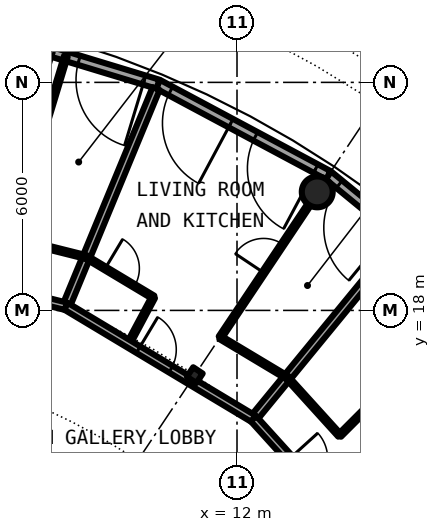
"""IFC4 building model, lengths in metres.
Left out: names, types, materials, properties, quantities, classifications, styles, units other than length and angle.
Written with IfcOpenShell. Run it as: python <this file> out.ifc"""

import sys

from ifc_helpers import new_model, si_unit, direction, frame, frame_2d, origin, origin_2d, place, context, subcontext, project, spatial, rectangle, hollow_circle, i_section, extrude, element, fill, save


model = new_model("IFC4")
c1 = context("Model", 3, precision=1e-05, world=origin(), true_north=direction((0.0, 1.0)))
c2 = subcontext(c1, "Body", "Model", "MODEL_VIEW")
j1 = project(units=[si_unit("LENGTHUNIT", "METRE"), si_unit("PLANEANGLEUNIT", "RADIAN")], contexts=[c1])
p1 = place(None, origin())
s1 = spatial("IfcSite", under=j1, at=p1, CompositionType="ELEMENT")
p2 = place(p1, origin())
s2 = spatial("IfcBuilding", under=s1, at=p2, CompositionType="ELEMENT")
p3 = place(p2, frame((0.0, 0.0, 237.1)))
s3 = spatial("IfcBuildingStorey", under=s2, at=p3, CompositionType="ELEMENT", Elevation=237.1)
p4 = place(p3, frame((14.112, 21.119, 0.0), z_axis=(0.0, 0.0, 1.0), x_axis=(1.0, 0.0, 0.0)))
e1 = element("IfcColumn", 1, at=p4, inside=s3, PredefinedType="COLUMN", context=c2, shape_type="SweptSolid", body=[
    extrude(hollow_circle(Radius=0.406, WallThickness=0.03, at=origin_2d()), origin(), (0.0, 0.0, 1.0), 3.05),
])
p5 = place(p3, frame((10.889, 16.297, 0.0), z_axis=(0.0, 0.0, 1.0), x_axis=(0.55557023302, 0.831469612303, 0.0)))
e2 = element("IfcColumn", 2, at=p5, inside=s3, PredefinedType="COLUMN", context=c2, shape_type="SweptSolid", body=[
    extrude(i_section(OverallWidth=0.3, OverallDepth=0.3, WebThickness=0.011, FlangeThickness=0.019, FilletRadius=0.027, at=origin_2d()), origin(), (0.0, 0.0, 1.0), 3.05),
])
p6 = place(p3, frame((18.332, 18.332, 0.0), z_axis=(0.0, 0.0, 1.0), x_axis=(-0.77306189429, 0.63433059803, 0.0)))
e3 = element("IfcWall", 3, at=p6, inside=s3, PredefinedType="SOLIDWALL", context=c2, shape_type="SweptSolid", body=[
    extrude(rectangle(XDim=5.082, YDim=0.25, at=frame_2d((2.541, 0.0))), origin(), (0.0, 0.0, 1.0), 2.7),
])
p7 = place(p6, frame((0.374, 0.0, 0.0)))
e4 = element("IfcOpeningElement", 4, at=p7, cuts=e3, PredefinedType="OPENING", context=c2, shape_type="SweptSolid", body=[
    extrude(rectangle(XDim=1.8, YDim=2.2, at=frame_2d((0.9, 1.1))), frame((0.0, 0.135, 0.0), z_axis=(0.0, -1.0, 0.0), x_axis=(1.0, 0.0, 0.0)), (0.0, 0.0, 1.0), 0.27),
])
p8 = place(p6, frame((2.909, 0.0, 0.0)))
e5 = element("IfcOpeningElement", 5, at=p8, cuts=e3, PredefinedType="OPENING", context=c2, shape_type="SweptSolid", body=[
    extrude(rectangle(XDim=1.8, YDim=2.2, at=frame_2d((0.9, 1.1))), frame((0.0, 0.135, 0.0), z_axis=(0.0, -1.0, 0.0), x_axis=(1.0, 0.0, 0.0)), (0.0, 0.0, 1.0), 0.27),
])
p9 = place(p3, frame((14.403, 21.556, 0.0), z_axis=(0.0, 0.0, 1.0), x_axis=(-0.881903089468, 0.47143073806, 0.0)))
e6 = element("IfcWall", 6, at=p9, inside=s3, PredefinedType="SOLIDWALL", context=c2, shape_type="SweptSolid", body=[
    extrude(rectangle(XDim=5.082, YDim=0.25, at=frame_2d((2.541, 0.0))), origin(), (0.0, 0.0, 1.0), 2.7),
])
p10 = place(p9, frame((0.374, 0.0, 0.0)))
e7 = element("IfcOpeningElement", 7, at=p10, cuts=e6, PredefinedType="OPENING", context=c2, shape_type="SweptSolid", body=[
    extrude(rectangle(XDim=1.8, YDim=2.2, at=frame_2d((0.9, 1.1))), frame((0.0, 0.135, 0.0), z_axis=(0.0, -1.0, 0.0), x_axis=(1.0, 0.0, 0.0)), (0.0, 0.0, 1.0), 0.27),
])
p11 = place(p9, frame((2.909, 0.0, 0.0)))
e8 = element("IfcOpeningElement", 8, at=p11, cuts=e6, PredefinedType="OPENING", context=c2, shape_type="SweptSolid", body=[
    extrude(rectangle(XDim=1.8, YDim=2.2, at=frame_2d((0.9, 1.1))), frame((0.0, 0.135, 0.0), z_axis=(0.0, -1.0, 0.0), x_axis=(1.0, 0.0, 0.0)), (0.0, 0.0, 1.0), 0.27),
])
p12 = place(p3, frame((9.921, 23.952, 0.0), z_axis=(0.0, 0.0, 1.0), x_axis=(-0.956941126395, 0.290282070774, 0.0)))
e9 = element("IfcWall", 9, at=p12, inside=s3, PredefinedType="SOLIDWALL", context=c2, shape_type="SweptSolid", body=[
    extrude(rectangle(XDim=5.082, YDim=0.25, at=frame_2d((2.541, 0.0))), origin(), (0.0, 0.0, 1.0), 2.7),
])
p13 = place(p12, frame((0.374, 0.0, 0.0)))
e10 = element("IfcOpeningElement", 10, at=p13, cuts=e9, PredefinedType="OPENING", context=c2, shape_type="SweptSolid", body=[
    extrude(rectangle(XDim=1.8, YDim=2.2, at=frame_2d((0.9, 1.1))), frame((0.0, 0.135, 0.0), z_axis=(0.0, -1.0, 0.0), x_axis=(1.0, 0.0, 0.0)), (0.0, 0.0, 1.0), 0.27),
])
p14 = place(p12, frame((2.861, 0.0, 0.0)))
e11 = element("IfcOpeningElement", 11, at=p14, cuts=e9, PredefinedType="OPENING", context=c2, shape_type="SweptSolid", body=[
    extrude(rectangle(XDim=1.8, YDim=2.2, at=frame_2d((0.9, 1.1))), frame((0.0, 0.135, 0.0), z_axis=(0.0, -1.0, 0.0), x_axis=(1.0, 0.0, 0.0)), (0.0, 0.0, 1.0), 0.27),
])
p15 = place(p3, frame((7.501, 18.108, 0.0), z_axis=(0.0, 0.0, 1.0), x_axis=(0.382282230395, 0.924045613768, 0.0)))
e12 = element("IfcWall", 12, at=p15, inside=s3, PredefinedType="PARTITIONING", context=c2, shape_type="SweptSolid", body=[
    extrude(rectangle(XDim=6.2, YDim=0.2, at=frame_2d((3.1, 0.0))), origin(), (0.0, 0.0, 1.0), 2.7),
])
p16 = place(p3, frame((6.044, 19.901, 0.0), z_axis=(0.0, 0.0, 1.0), x_axis=(0.290516718077, 0.956869916194, 0.0)))
e13 = element("IfcWall", 13, at=p16, inside=s3, PredefinedType="PARTITIONING", context=c2, shape_type="SweptSolid", body=[
    extrude(rectangle(XDim=5.002, YDim=0.1, at=frame_2d((2.501, 0.0))), origin(), (0.0, 0.0, 1.0), 2.7),
])
p17 = place(p16, frame((2.051, 0.0, 0.0)))
e14 = element("IfcOpeningElement", 14, at=p17, cuts=e13, PredefinedType="OPENING", context=c2, shape_type="SweptSolid", body=[
    extrude(rectangle(XDim=0.9, YDim=2.3, at=frame_2d((0.45, 1.15))), frame((0.0, 0.06, 0.0), z_axis=(0.0, -1.0, 0.0), x_axis=(1.0, 0.0, 0.0)), (0.0, 0.0, 1.0), 0.12),
])
p18 = place(p3, frame((9.145, 17.122, 0.0), z_axis=(0.0, 0.0, 1.0), x_axis=(0.471072596947, 0.882094444153, 0.0)))
e15 = element("IfcWall", 15, at=p18, inside=s3, PredefinedType="PARTITIONING", context=c2, shape_type="SweptSolid", body=[
    extrude(rectangle(XDim=1.386, YDim=0.1, at=frame_2d((0.693, 0.0))), origin(), (0.0, 0.0, 1.0), 2.7),
])
p19 = place(p3, frame((11.56, 17.289, 0.0), z_axis=(0.0, 0.0, 1.0), x_axis=(0.555959489687, 0.831209387475, 0.0)))
e16 = element("IfcWall", 16, at=p19, inside=s3, PredefinedType="PARTITIONING", context=c2, shape_type="SweptSolid", body=[
    extrude(rectangle(XDim=4.203, YDim=0.1, at=frame_2d((2.102, 0.0))), origin(), (0.0, 0.0, 1.0), 2.7),
])
p20 = place(p19, frame((2.051, 0.0, 0.0)))
e17 = element("IfcOpeningElement", 17, at=p20, cuts=e16, PredefinedType="OPENING", context=c2, shape_type="SweptSolid", body=[
    extrude(rectangle(XDim=0.9, YDim=2.3, at=frame_2d((0.45, 1.15))), frame((0.0, 0.06, 0.0), z_axis=(0.0, -1.0, 0.0), x_axis=(1.0, 0.0, 0.0)), (0.0, 0.0, 1.0), 0.12),
])
p21 = place(p3, frame((12.432, 15.153, 0.0), z_axis=(0.0, 0.0, 1.0), x_axis=(0.634356436091, 0.773040692324, 0.0)))
e18 = element("IfcWall", 18, at=p21, inside=s3, PredefinedType="PARTITIONING", context=c2, shape_type="SweptSolid", body=[
    extrude(rectangle(XDim=6.2, YDim=0.2, at=frame_2d((3.1, 0.0))), origin(), (0.0, 0.0, 1.0), 2.7),
])
p22 = place(p3, frame((14.702, 14.711, 0.0), z_axis=(0.0, 0.0, 1.0), x_axis=(0.706911528738, 0.707301979735, 0.0)))
e19 = element("IfcWall", 19, at=p22, inside=s3, PredefinedType="PARTITIONING", context=c2, shape_type="SweptSolid", body=[
    extrude(rectangle(XDim=5.002, YDim=0.1, at=frame_2d((2.501, 0.0))), origin(), (0.0, 0.0, 1.0), 2.7),
])
p23 = place(p22, frame((2.051, 0.0, 0.0)))
e20 = element("IfcOpeningElement", 20, at=p23, cuts=e19, PredefinedType="OPENING", context=c2, shape_type="SweptSolid", body=[
    extrude(rectangle(XDim=0.9, YDim=2.3, at=frame_2d((0.45, 1.15))), frame((0.0, 0.06, 0.0), z_axis=(0.0, -1.0, 0.0), x_axis=(1.0, 0.0, 0.0)), (0.0, 0.0, 1.0), 0.12),
])
p24 = place(p3, frame((4.357, 14.353, 0.0), z_axis=(0.0, 0.0, 1.0), x_axis=(0.803168959756, -0.595751308923, 0.0)))
e21 = element("IfcWall", 21, at=p24, inside=s3, PredefinedType="PARTITIONING", context=c2, shape_type="SweptSolid", body=[
    extrude(rectangle(XDim=8.659, YDim=0.2, at=frame_2d((4.33, 0.0))), origin(), (0.0, 0.0, 1.0), 2.7),
])
p25 = place(p24, frame((3.829, 0.0, 0.0)))
e22 = element("IfcOpeningElement", 22, at=p25, cuts=e21, PredefinedType="OPENING", context=c2, shape_type="SweptSolid", body=[
    extrude(rectangle(XDim=1.0, YDim=2.3, at=frame_2d((0.5, 1.15))), frame((0.0, 0.11, 0.0), z_axis=(0.0, -1.0, 0.0), x_axis=(1.0, 0.0, 0.0)), (0.0, 0.0, 1.0), 0.22),
])
p26 = place(p3, frame((1.921, 19.506, 0.0), z_axis=(0.0, 0.0, 1.0), x_axis=(0.970012544183, -0.243054858266, 0.0)))
e23 = element("IfcWall", 23, at=p26, inside=s3, PredefinedType="PARTITIONING", context=c2, shape_type="SweptSolid", body=[
    extrude(rectangle(XDim=5.753, YDim=0.2, at=frame_2d((2.876, 0.0))), origin(), (0.0, 0.0, 1.0), 2.45),
])
p27 = place(p26, frame((3.335, 0.0, 0.0)))
e24 = element("IfcOpeningElement", 24, at=p27, cuts=e23, PredefinedType="OPENING", context=c2, shape_type="SweptSolid", body=[
    extrude(rectangle(XDim=1.0, YDim=2.3, at=frame_2d((0.5, 1.15))), frame((0.0, 0.11, 0.0), z_axis=(0.0, -1.0, 0.0), x_axis=(1.0, 0.0, 0.0)), (0.0, 0.0, 1.0), 0.22),
])
p28 = place(p3, frame((7.501, 18.108, 0.0), z_axis=(0.0, 0.0, 1.0), x_axis=(0.857560257806, -0.514383518624, 0.0)))
e25 = element("IfcWall", 25, at=p28, inside=s3, PredefinedType="PARTITIONING", context=c2, shape_type="SweptSolid", body=[
    extrude(rectangle(XDim=5.758, YDim=0.2, at=frame_2d((2.879, 0.0))), origin(), (0.0, 0.0, 1.0), 2.45),
])
p29 = place(p28, frame((2.217, 0.0, 0.0)))
e26 = element("IfcOpeningElement", 26, at=p29, cuts=e25, PredefinedType="OPENING", context=c2, shape_type="SweptSolid", body=[
    extrude(rectangle(XDim=1.0, YDim=2.3, at=frame_2d((0.5, 1.15))), frame((0.0, 0.11, 0.0), z_axis=(0.0, -1.0, 0.0), x_axis=(1.0, 0.0, 0.0)), (0.0, 0.0, 1.0), 0.22),
])
p30 = place(p3, frame((12.434, 15.151, 0.0), z_axis=(0.0, 0.0, 1.0), x_axis=(0.671619657805, -0.740896102871, 0.0)))
e27 = element("IfcWall", 27, at=p30, inside=s3, PredefinedType="PARTITIONING", context=c2, shape_type="SweptSolid", body=[
    extrude(rectangle(XDim=5.6, YDim=0.2, at=frame_2d((2.8, 0.0))), origin(), (0.0, 0.0, 1.0), 2.45),
])
p31 = place(p30, frame((1.417, 0.0, 0.0)))
e28 = element("IfcOpeningElement", 28, at=p31, cuts=e27, PredefinedType="OPENING", context=c2, shape_type="SweptSolid", body=[
    extrude(rectangle(XDim=1.0, YDim=2.3, at=frame_2d((0.5, 1.15))), frame((0.0, 0.11, 0.0), z_axis=(0.0, -1.0, 0.0), x_axis=(1.0, 0.0, 0.0)), (0.0, 0.0, 1.0), 0.22),
])
p32 = place(p3, frame((6.032, 19.904, 0.0), z_axis=(0.0, 0.0, 1.0), x_axis=(0.970023493589, -0.243011155889, 0.0)))
e29 = element("IfcWall", 29, at=p32, inside=s3, PredefinedType="PARTITIONING", context=c2, shape_type="SweptSolid", body=[
    extrude(rectangle(XDim=2.053, YDim=0.1, at=frame_2d((1.027, 0.0))), origin(), (0.0, 0.0, 1.0), 2.7),
])
p33 = place(p3, frame((8.036, 19.401, 0.0), z_axis=(0.0, 0.0, 1.0), x_axis=(0.857838403859, -0.513919519832, 0.0)))
e30 = element("IfcWall", 30, at=p33, inside=s3, PredefinedType="PARTITIONING", context=c2, shape_type="SweptSolid", body=[
    extrude(rectangle(XDim=2.056, YDim=0.1, at=frame_2d((1.028, 0.0))), origin(), (0.0, 0.0, 1.0), 2.7),
])
p34 = place(p33, frame((0.577, 0.0, 0.0)))
e31 = element("IfcOpeningElement", 31, at=p34, cuts=e30, PredefinedType="OPENING", context=c2, shape_type="SweptSolid", body=[
    extrude(rectangle(XDim=0.9, YDim=2.3, at=frame_2d((0.45, 1.15))), frame((0.0, 0.06, 0.0), z_axis=(0.0, -1.0, 0.0), x_axis=(1.0, 0.0, 0.0)), (0.0, 0.0, 1.0), 0.12),
])
p35 = place(p3, frame((11.56, 17.289, 0.0), z_axis=(0.0, 0.0, 1.0), x_axis=(0.857713062192, -0.514128683254, 0.0)))
e32 = element("IfcWall", 32, at=p35, inside=s3, PredefinedType="PARTITIONING", context=c2, shape_type="SweptSolid", body=[
    extrude(rectangle(XDim=2.054, YDim=0.1, at=frame_2d((1.027, 0.0))), origin(), (0.0, 0.0, 1.0), 2.7),
])
p36 = place(p3, frame((13.321, 16.233, 0.0), z_axis=(0.0, 0.0, 1.0), x_axis=(0.671678456097, -0.74084279818, 0.0)))
e33 = element("IfcWall", 33, at=p36, inside=s3, PredefinedType="PARTITIONING", context=c2, shape_type="SweptSolid", body=[
    extrude(rectangle(XDim=2.054, YDim=0.1, at=frame_2d((1.027, 0.0))), origin(), (0.0, 0.0, 1.0), 2.7),
])
p37 = place(p8, origin())
e34 = element("IfcDoor", 34, at=p37, inside=s3, OperationType="SINGLE_SWING_LEFT", PredefinedType="DOOR", context=c2, shape_type="SweptSolid", body=[
    extrude(rectangle(XDim=1.8, YDim=2.2, at=frame_2d((0.9, 1.1))), frame((0.0, 0.025, 0.0), z_axis=(0.0, -1.0, 0.0), x_axis=(1.0, 0.0, 0.0)), (0.0, 0.0, 1.0), 0.05),
])
fill(e5, e34)
p38 = place(p10, origin())
e35 = element("IfcDoor", 35, at=p38, inside=s3, OperationType="SINGLE_SWING_LEFT", PredefinedType="DOOR", context=c2, shape_type="SweptSolid", body=[
    extrude(rectangle(XDim=1.8, YDim=2.2, at=frame_2d((0.9, 1.1))), frame((0.0, 0.025, 0.0), z_axis=(0.0, -1.0, 0.0), x_axis=(1.0, 0.0, 0.0)), (0.0, 0.0, 1.0), 0.05),
])
fill(e7, e35)
p39 = place(p11, origin())
e36 = element("IfcDoor", 36, at=p39, inside=s3, OperationType="SINGLE_SWING_LEFT", PredefinedType="DOOR", context=c2, shape_type="SweptSolid", body=[
    extrude(rectangle(XDim=1.8, YDim=2.2, at=frame_2d((0.9, 1.1))), frame((0.0, 0.025, 0.0), z_axis=(0.0, -1.0, 0.0), x_axis=(1.0, 0.0, 0.0)), (0.0, 0.0, 1.0), 0.05),
])
fill(e8, e36)
p40 = place(p13, origin())
e37 = element("IfcDoor", 37, at=p40, inside=s3, OperationType="SINGLE_SWING_LEFT", PredefinedType="DOOR", context=c2, shape_type="SweptSolid", body=[
    extrude(rectangle(XDim=1.8, YDim=2.2, at=frame_2d((0.9, 1.1))), frame((0.0, 0.025, 0.0), z_axis=(0.0, -1.0, 0.0), x_axis=(1.0, 0.0, 0.0)), (0.0, 0.0, 1.0), 0.05),
])
fill(e10, e37)
p41 = place(p14, origin())
e38 = element("IfcDoor", 38, at=p41, inside=s3, OperationType="SINGLE_SWING_LEFT", PredefinedType="DOOR", context=c2, shape_type="SweptSolid", body=[
    extrude(rectangle(XDim=1.8, YDim=2.2, at=frame_2d((0.9, 1.1))), frame((0.0, 0.025, 0.0), z_axis=(0.0, -1.0, 0.0), x_axis=(1.0, 0.0, 0.0)), (0.0, 0.0, 1.0), 0.05),
])
fill(e11, e38)
p42 = place(p29, origin())
e39 = element("IfcDoor", 39, at=p42, inside=s3, OperationType="SINGLE_SWING_LEFT", PredefinedType="DOOR", context=c2, shape_type="SweptSolid", body=[
    extrude(rectangle(XDim=1.0, YDim=2.3, at=frame_2d((0.5, 1.15))), frame((0.0, 0.025, 0.0), z_axis=(0.0, -1.0, 0.0), x_axis=(1.0, 0.0, 0.0)), (0.0, 0.0, 1.0), 0.05),
])
fill(e26, e39)
p43 = place(p34, origin())
e40 = element("IfcDoor", 40, at=p43, inside=s3, OperationType="SINGLE_SWING_LEFT", PredefinedType="DOOR", context=c2, shape_type="SweptSolid", body=[
    extrude(rectangle(XDim=0.9, YDim=2.3, at=frame_2d((0.45, 1.15))), frame((0.0, 0.025, 0.0), z_axis=(0.0, -1.0, 0.0), x_axis=(1.0, 0.0, 0.0)), (0.0, 0.0, 1.0), 0.05),
])
fill(e31, e40)
p44 = place(p20, origin())
e41 = element("IfcDoor", 41, at=p44, inside=s3, OperationType="SINGLE_SWING_RIGHT", PredefinedType="DOOR", context=c2, shape_type="SweptSolid", body=[
    extrude(rectangle(XDim=0.9, YDim=2.3, at=frame_2d((0.45, 1.15))), frame((0.0, 0.025, 0.0), z_axis=(0.0, -1.0, 0.0), x_axis=(1.0, 0.0, 0.0)), (0.0, 0.0, 1.0), 0.05),
])
fill(e17, e41)
save(model, sys.argv[1])
